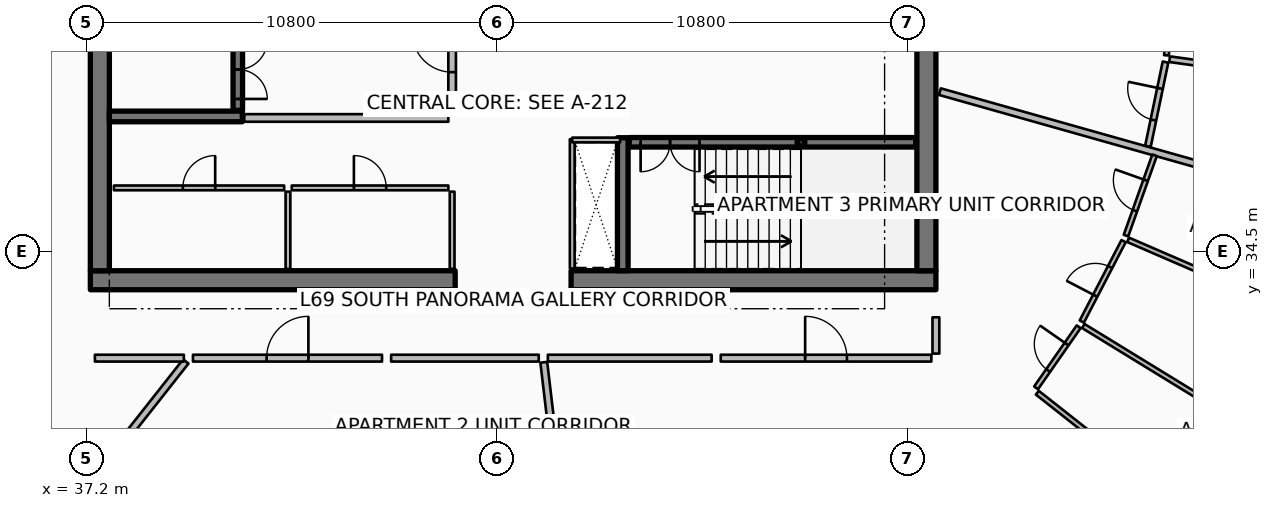
"""IFC4 building model, lengths in metres.
Left out: names, types, materials, properties, quantities, classifications, styles, units other than length and angle.
Written with IfcOpenShell. Run it as: python <this file> out.ifc"""

import sys

from ifc_helpers import new_model, si_unit, direction, frame, frame_2d, origin, origin_2d, place, context, subcontext, project, spatial, rectangle, hollow_rectangle, extrude, element, fill, save


model = new_model("IFC4")
c1 = context("Model", 3, precision=1e-05, world=origin(), true_north=direction((0.0, 1.0)))
c2 = subcontext(c1, "Body", "Model", "MODEL_VIEW")
j1 = project(units=[si_unit("LENGTHUNIT", "METRE"), si_unit("PLANEANGLEUNIT", "RADIAN")], contexts=[c1])
p1 = place(None, origin())
s1 = spatial("IfcSite", under=j1, at=p1, CompositionType="ELEMENT")
p2 = place(p1, origin())
s2 = spatial("IfcBuilding", under=s1, at=p2, CompositionType="ELEMENT")
p3 = place(p2, frame((0.0, 0.0, 275.2)))
s3 = spatial("IfcBuildingStorey", under=s2, at=p3, CompositionType="ELEMENT", Elevation=275.2)
p4 = place(p3, frame((37.3, 33.75, 0.0), z_axis=(0.0, 0.0, 1.0), x_axis=(1.0, 0.0, 0.0)))
e1 = element("IfcWall", 1, at=p4, inside=s3, PredefinedType="SHEAR", context=c2, shape_type="SweptSolid", body=[
    extrude(rectangle(XDim=9.6, YDim=0.5, at=frame_2d((4.8, 0.0))), origin(), (0.0, 0.0, 1.0), 3.85),
])
p5 = place(p3, frame((49.95, 33.75, 0.0), z_axis=(0.0, 0.0, 1.0), x_axis=(1.0, 0.0, 0.0)))
e2 = element("IfcWall", 2, at=p5, inside=s3, PredefinedType="SHEAR", context=c2, shape_type="SweptSolid", body=[
    extrude(rectangle(XDim=9.6, YDim=0.5, at=frame_2d((4.8, 0.0))), origin(), (0.0, 0.0, 1.0), 3.85),
])
for number, where, z_axis, x_axis in (
    (3, (37.55, 34.0, 0.0), (0.0, 0.0, 1.0), (0.0, 1.0, 0.0)),
    (4, (59.3, 34.0, 0.0), (0.0, 0.0, 1.0), (0.0, 1.0, 0.0)),
):
    element("IfcWall", number, at=place(p3, frame(where, z_axis=z_axis, x_axis=x_axis)), inside=s3, PredefinedType="SHEAR", context=c2, shape_type="SweptSolid", body=[
        extrude(rectangle(XDim=16.0, YDim=0.5, at=frame_2d((8.0, 0.0))), origin(), (0.0, 0.0, 1.0), 3.85),
    ])
for number, where, z_axis, x_axis in (
    (5, (37.8, 38.06, 0.0), (0.0, 0.0, 1.0), (1.0, 0.0, 0.0)),
    (6, (51.31, 34.0, 0.0), (0.0, 0.0, 1.0), (0.0, 1.0, 0.0)),
):
    element("IfcWall", number, at=place(p3, frame(where, z_axis=z_axis, x_axis=x_axis)), inside=s3, PredefinedType="SHEAR", context=c2, shape_type="SweptSolid", body=[
        extrude(rectangle(XDim=3.5, YDim=0.28, at=frame_2d((1.75, 0.0))), origin(), (0.0, 0.0, 1.0), 3.85),
    ])
p6 = place(p3, frame((56.0, 37.38, 0.0), z_axis=(0.0, 0.0, 1.0), x_axis=(1.0, 0.0, 0.0)))
e7 = element("IfcColumn", 7, at=p6, inside=s3, PredefinedType="COLUMN", context=c2, shape_type="SweptSolid", body=[
    extrude(hollow_rectangle(XDim=0.2, YDim=0.2, WallThickness=0.01, InnerFilletRadius=0.01, OuterFilletRadius=0.02, at=origin_2d()), origin(), (0.0, 0.0, 1.0), 1.72),
])
p7 = place(p3, frame((41.18, 38.22, 0.0), z_axis=(0.0, 0.0, 1.0), x_axis=(0.0, 1.0, 0.0)))
e8 = element("IfcWall", 8, at=p7, inside=s3, PredefinedType="SOLIDWALL", context=c2, shape_type="SweptSolid", body=[
    extrude(rectangle(XDim=7.56, YDim=0.25, at=frame_2d((3.78, 0.0))), origin(), (0.0, 0.0, 1.0), 3.59),
])
p8 = place(p7, frame((0.3, 0.0, 0.0)))
e9 = element("IfcOpeningElement", 9, at=p8, cuts=e8, PredefinedType="OPENING", context=c2, shape_type="SweptSolid", body=[
    extrude(rectangle(XDim=1.55, YDim=2.15, at=frame_2d((0.775, 1.075))), frame((0.0, 0.135, 0.0), z_axis=(0.0, -1.0, 0.0), x_axis=(1.0, 0.0, 0.0)), (0.0, 0.0, 1.0), 0.27),
])
p9 = place(p3, frame((51.48, 37.38, 0.0), z_axis=(0.0, 0.0, 1.0), x_axis=(1.0, 0.0, 0.0)))
e10 = element("IfcWall", 10, at=p9, inside=s3, PredefinedType="SOLIDWALL", context=c2, shape_type="SweptSolid", body=[
    extrude(rectangle(XDim=7.54, YDim=0.25, at=frame_2d((3.77, 0.0))), origin(), (0.0, 0.0, 1.0), 3.59),
])
p10 = place(p9, frame((0.3, 0.0, 0.0)))
e11 = element("IfcOpeningElement", 11, at=p10, cuts=e10, PredefinedType="OPENING", context=c2, shape_type="SweptSolid", body=[
    extrude(rectangle(XDim=1.55, YDim=2.15, at=frame_2d((0.775, 1.075))), frame((0.0, 0.135, 0.0), z_axis=(0.0, -1.0, 0.0), x_axis=(1.0, 0.0, 0.0)), (0.0, 0.0, 1.0), 0.27),
])
for number, where, z_axis, x_axis in (
    (12, (46.82, 34.05, 0.0), (0.0, 0.0, 1.0), (0.0, 1.0, 0.0)),
    (13, (42.5, 34.05, 0.0), (0.0, 0.0, 1.0), (0.0, 1.0, 0.0)),
):
    element("IfcWall", number, at=place(p3, frame(where, z_axis=z_axis, x_axis=x_axis)), inside=s3, PredefinedType="PARTITIONING", context=c2, shape_type="SweptSolid", body=[
        extrude(rectangle(XDim=2.03, YDim=0.125, at=frame_2d((1.015, 0.0))), origin(), (0.0, 0.0, 1.0), 3.03),
    ])
p11 = place(p3, frame((37.92, 36.18, 0.0), z_axis=(0.0, 0.0, 1.0), x_axis=(1.0, 0.0, 0.0)))
e14 = element("IfcWall", 14, at=p11, inside=s3, PredefinedType="PARTITIONING", context=c2, shape_type="SweptSolid", body=[
    extrude(rectangle(XDim=4.48, YDim=0.125, at=frame_2d((2.24, 0.0))), origin(), (0.0, 0.0, 1.0), 3.03),
])
p12 = place(p11, frame((1.815, 0.0, 0.0)))
e15 = element("IfcOpeningElement", 15, at=p12, cuts=e14, PredefinedType="OPENING", context=c2, shape_type="SweptSolid", body=[
    extrude(rectangle(XDim=0.85, YDim=2.06, at=frame_2d((0.425, 1.03))), frame((0.0, 0.073, 0.0), z_axis=(0.0, -1.0, 0.0), x_axis=(1.0, 0.0, 0.0)), (0.0, 0.0, 1.0), 0.145),
])
p13 = place(p3, frame((42.6, 36.18, 0.0), z_axis=(0.0, 0.0, 1.0), x_axis=(1.0, 0.0, 0.0)))
e16 = element("IfcWall", 16, at=p13, inside=s3, PredefinedType="PARTITIONING", context=c2, shape_type="SweptSolid", body=[
    extrude(rectangle(XDim=4.12, YDim=0.125, at=frame_2d((2.06, 0.0))), origin(), (0.0, 0.0, 1.0), 3.03),
])
p14 = place(p13, frame((1.635, 0.0, 0.0)))
e17 = element("IfcOpeningElement", 17, at=p14, cuts=e16, PredefinedType="OPENING", context=c2, shape_type="SweptSolid", body=[
    extrude(rectangle(XDim=0.85, YDim=2.06, at=frame_2d((0.425, 1.03))), frame((0.0, 0.073, 0.0), z_axis=(0.0, -1.0, 0.0), x_axis=(1.0, 0.0, 0.0)), (0.0, 0.0, 1.0), 0.145),
])
p15 = place(p3, frame((41.35, 38.02, 0.0), z_axis=(0.0, 0.0, 1.0), x_axis=(1.0, 0.0, 0.0)))
e18 = element("IfcWall", 18, at=p15, inside=s3, PredefinedType="PARTITIONING", context=c2, shape_type="SweptSolid", body=[
    extrude(rectangle(XDim=5.37, YDim=0.2, at=frame_2d((2.685, 0.0))), origin(), (0.0, 0.0, 1.0), 3.59),
])
p16 = place(p3, frame((46.82, 38.12, 0.0), z_axis=(0.0, 0.0, 1.0), x_axis=(0.0, 1.0, 0.0)))
e19 = element("IfcWall", 19, at=p16, inside=s3, PredefinedType="PARTITIONING", context=c2, shape_type="SweptSolid", body=[
    extrude(rectangle(XDim=3.26, YDim=0.2, at=frame_2d((1.63, 0.0))), origin(), (0.0, 0.0, 1.0), 3.59),
])
p17 = place(p16, frame((1.105, 0.0, 0.0)))
e20 = element("IfcOpeningElement", 20, at=p17, cuts=e19, PredefinedType="OPENING", context=c2, shape_type="SweptSolid", body=[
    extrude(rectangle(XDim=1.05, YDim=2.1, at=frame_2d((0.525, 1.05))), frame((0.0, 0.11, 0.0), z_axis=(0.0, -1.0, 0.0), x_axis=(1.0, 0.0, 0.0)), (0.0, 0.0, 1.0), 0.22),
])
p18 = place(p3, frame((49.98, 34.06, 0.0), z_axis=(0.0, 0.0, 1.0), x_axis=(0.0, 1.0, 0.0)))
e21 = element("IfcWall", 21, at=p18, inside=s3, PredefinedType="PARTITIONING", context=c2, shape_type="SweptSolid", body=[
    extrude(rectangle(XDim=3.4, YDim=0.125, at=frame_2d((1.7, 0.0))), origin(), (0.0, 0.0, 1.0), 3.03),
])
p19 = place(p3, frame((49.98, 37.44, 0.0), z_axis=(0.0, 0.0, 1.0), x_axis=(1.0, 0.0, 0.0)))
e22 = element("IfcWall", 22, at=p19, inside=s3, PredefinedType="PARTITIONING", context=c2, shape_type="SweptSolid", body=[
    extrude(rectangle(XDim=1.26, YDim=0.125, at=frame_2d((0.63, 0.0))), origin(), (0.0, 0.0, 1.0), 3.03),
])
p20 = place(p3, frame((39.812, 31.614, 0.0), z_axis=(0.0, 0.0, 1.0), x_axis=(-0.619097230176, -0.785314344443, 0.0)))
e23 = element("IfcWall", 23, at=p20, inside=s3, PredefinedType="PARTITIONING", context=c2, shape_type="SweptSolid", body=[
    extrude(rectangle(XDim=16.37, YDim=0.18, at=frame_2d((8.185, 0.0))), origin(), (0.0, 0.0, 1.0), 2.957),
])
p21 = place(p3, frame((49.232, 31.591, 0.0), z_axis=(0.0, 0.0, 1.0), x_axis=(0.117545848714, -0.993067456646, 0.0)))
e24 = element("IfcWall", 24, at=p21, inside=s3, PredefinedType="PARTITIONING", context=c2, shape_type="SweptSolid", body=[
    extrude(rectangle(XDim=14.213, YDim=0.18, at=frame_2d((7.106, 0.0))), origin(), (0.0, 0.0, 1.0), 2.957),
])
p22 = place(p3, frame((59.656, 38.713, 0.0), z_axis=(0.0, 0.0, 1.0), x_axis=(0.962454756022, -0.27144215334, 0.0)))
e25 = element("IfcWall", 25, at=p22, inside=s3, PredefinedType="PARTITIONING", context=c2, shape_type="SweptSolid", body=[
    extrude(rectangle(XDim=17.385, YDim=0.18, at=frame_2d((8.692, 0.0))), origin(), (0.0, 0.0, 1.0), 2.957),
])
p23 = place(p3, frame((37.42, 31.7, 0.0), z_axis=(0.0, 0.0, 1.0), x_axis=(1.0, 0.0, 0.0)))
e26 = element("IfcWall", 26, at=p23, inside=s3, PredefinedType="PARTITIONING", context=c2, shape_type="SweptSolid", body=[
    extrude(rectangle(XDim=2.34, YDim=0.18, at=frame_2d((1.17, 0.0))), origin(), (0.0, 0.0, 1.0), 2.957),
])
p24 = place(p3, frame((40.0, 31.7, 0.0), z_axis=(0.0, 0.0, 1.0), x_axis=(1.0, 0.0, 0.0)))
e27 = element("IfcWall", 27, at=p24, inside=s3, PredefinedType="PARTITIONING", context=c2, shape_type="SweptSolid", body=[
    extrude(rectangle(XDim=4.975, YDim=0.18, at=frame_2d((2.488, 0.0))), origin(), (0.0, 0.0, 1.0), 2.957),
])
p25 = place(p24, frame((1.938, 0.0, 0.0)))
e28 = element("IfcOpeningElement", 28, at=p25, cuts=e27, PredefinedType="OPENING", context=c2, shape_type="SweptSolid", body=[
    extrude(rectangle(XDim=1.1, YDim=2.1, at=frame_2d((0.55, 1.05))), frame((0.0, 0.1, 0.0), z_axis=(0.0, -1.0, 0.0), x_axis=(1.0, 0.0, 0.0)), (0.0, 0.0, 1.0), 0.2),
])
p26 = place(p3, frame((45.215, 31.7, 0.0), z_axis=(0.0, 0.0, 1.0), x_axis=(1.0, 0.0, 0.0)))
e29 = element("IfcWall", 29, at=p26, inside=s3, PredefinedType="PARTITIONING", context=c2, shape_type="SweptSolid", body=[
    extrude(rectangle(XDim=3.884, YDim=0.18, at=frame_2d((1.942, 0.0))), origin(), (0.0, 0.0, 1.0), 2.957),
])
p27 = place(p3, frame((53.888, 31.7, 0.0), z_axis=(0.0, 0.0, 1.0), x_axis=(1.0, 0.0, 0.0)))
e30 = element("IfcWall", 30, at=p27, inside=s3, PredefinedType="PARTITIONING", context=c2, shape_type="SweptSolid", body=[
    extrude(rectangle(XDim=5.542, YDim=0.18, at=frame_2d((2.771, 0.0))), origin(), (0.0, 0.0, 1.0), 2.957),
])
p28 = place(p27, frame((2.221, 0.0, 0.0)))
e31 = element("IfcOpeningElement", 31, at=p28, cuts=e30, PredefinedType="OPENING", context=c2, shape_type="SweptSolid", body=[
    extrude(rectangle(XDim=1.1, YDim=2.1, at=frame_2d((0.55, 1.05))), frame((0.0, 0.1, 0.0), z_axis=(0.0, -1.0, 0.0), x_axis=(1.0, 0.0, 0.0)), (0.0, 0.0, 1.0), 0.2),
])
p29 = place(p3, frame((59.55, 31.82, 0.0), z_axis=(0.0, 0.0, 1.0), x_axis=(0.0, 1.0, 0.0)))
e32 = element("IfcWall", 32, at=p29, inside=s3, PredefinedType="PARTITIONING", context=c2, shape_type="SweptSolid", body=[
    extrude(rectangle(XDim=0.955, YDim=0.18, at=frame_2d((0.477, 0.0))), origin(), (0.0, 0.0, 1.0), 2.957),
])
p30 = place(p3, frame((49.339, 31.7, 0.0), z_axis=(0.0, 0.0, 1.0), x_axis=(1.0, 0.0, 0.0)))
e33 = element("IfcWall", 33, at=p30, inside=s3, PredefinedType="PARTITIONING", context=c2, shape_type="SweptSolid", body=[
    extrude(rectangle(XDim=4.309, YDim=0.18, at=frame_2d((2.155, 0.0))), origin(), (0.0, 0.0, 1.0), 2.957),
])
p31 = place(p3, frame((62.219, 30.791, 0.0), z_axis=(0.0, 0.0, 1.0), x_axis=(0.785316198055, -0.619094878893, 0.0)))
e34 = element("IfcWall", 34, at=p31, inside=s3, PredefinedType="PARTITIONING", context=c2, shape_type="SweptSolid", body=[
    extrude(rectangle(XDim=8.979, YDim=0.125, at=frame_2d((4.489, 0.0))), origin(), (0.0, 0.0, 1.0), 2.957),
])
p32 = place(p3, frame((63.429, 32.545, 0.0), z_axis=(0.0, 0.0, 1.0), x_axis=(0.852634226121, -0.522508254907, 0.0)))
e35 = element("IfcWall", 35, at=p32, inside=s3, PredefinedType="PARTITIONING", context=c2, shape_type="SweptSolid", body=[
    extrude(rectangle(XDim=9.151, YDim=0.125, at=frame_2d((4.576, 0.0))), origin(), (0.0, 0.0, 1.0), 3.03),
])
p33 = place(p3, frame((64.608, 34.813, 0.0), z_axis=(0.0, 0.0, 1.0), x_axis=(0.917754543675, -0.397148080146, 0.0)))
e36 = element("IfcWall", 36, at=p33, inside=s3, PredefinedType="PARTITIONING", context=c2, shape_type="SweptSolid", body=[
    extrude(rectangle(XDim=9.994, YDim=0.125, at=frame_2d((4.997, 0.0))), origin(), (0.0, 0.0, 1.0), 3.03),
])
p34 = place(p3, frame((62.186, 30.918, 0.0), z_axis=(0.0, 0.0, 1.0), x_axis=(0.571797742108, 0.820394625848, 0.0)))
e37 = element("IfcWall", 37, at=p34, inside=s3, PredefinedType="PARTITIONING", context=c2, shape_type="SweptSolid", body=[
    extrude(rectangle(XDim=1.96, YDim=0.125, at=frame_2d((0.98, 0.0))), origin(), (0.0, 0.0, 1.0), 2.957),
])
p35 = place(p34, frame((0.555, 0.0, 0.0)))
e38 = element("IfcOpeningElement", 38, at=p35, cuts=e37, PredefinedType="OPENING", context=c2, shape_type="SweptSolid", body=[
    extrude(rectangle(XDim=0.85, YDim=2.06, at=frame_2d((0.425, 1.03))), frame((0.0, 0.073, 0.0), z_axis=(0.0, -1.0, 0.0), x_axis=(1.0, 0.0, 0.0)), (0.0, 0.0, 1.0), 0.145),
])
p36 = place(p3, frame((63.389, 32.663, 0.0), z_axis=(0.0, 0.0, 1.0), x_axis=(0.461007635573, 0.887396168542, 0.0)))
e39 = element("IfcWall", 39, at=p36, inside=s3, PredefinedType="PARTITIONING", context=c2, shape_type="SweptSolid", body=[
    extrude(rectangle(XDim=2.384, YDim=0.125, at=frame_2d((1.192, 0.0))), origin(), (0.0, 0.0, 1.0), 3.03),
])
p37 = place(p36, frame((0.767, 0.0, 0.0)))
e40 = element("IfcOpeningElement", 40, at=p37, cuts=e39, PredefinedType="OPENING", context=c2, shape_type="SweptSolid", body=[
    extrude(rectangle(XDim=0.85, YDim=2.06, at=frame_2d((0.425, 1.03))), frame((0.0, 0.073, 0.0), z_axis=(0.0, -1.0, 0.0), x_axis=(1.0, 0.0, 0.0)), (0.0, 0.0, 1.0), 0.145),
])
p38 = place(p3, frame((64.552, 34.924, 0.0), z_axis=(0.0, 0.0, 1.0), x_axis=(0.335011815583, 0.942213926569, 0.0)))
e41 = element("IfcWall", 41, at=p38, inside=s3, PredefinedType="PARTITIONING", context=c2, shape_type="SweptSolid", body=[
    extrude(rectangle(XDim=2.242, YDim=0.125, at=frame_2d((1.121, 0.0))), origin(), (0.0, 0.0, 1.0), 2.957),
])
p39 = place(p38, frame((0.696, 0.0, 0.0)))
e42 = element("IfcOpeningElement", 42, at=p39, cuts=e41, PredefinedType="OPENING", context=c2, shape_type="SweptSolid", body=[
    extrude(rectangle(XDim=0.85, YDim=2.06, at=frame_2d((0.425, 1.03))), frame((0.0, 0.073, 0.0), z_axis=(0.0, -1.0, 0.0), x_axis=(1.0, 0.0, 0.0)), (0.0, 0.0, 1.0), 0.145),
])
p40 = place(p3, frame((65.129, 37.273, 0.0), z_axis=(0.0, 0.0, 1.0), x_axis=(0.204337271361, 0.978900546293, 0.0)))
e43 = element("IfcWall", 43, at=p40, inside=s3, PredefinedType="PARTITIONING", context=c2, shape_type="SweptSolid", body=[
    extrude(rectangle(XDim=2.265, YDim=0.15, at=frame_2d((1.133, 0.0))), origin(), (0.0, 0.0, 1.0), 2.957),
])
p41 = place(p40, frame((0.708, 0.0, 0.0)))
e44 = element("IfcOpeningElement", 44, at=p41, cuts=e43, PredefinedType="OPENING", context=c2, shape_type="SweptSolid", body=[
    extrude(rectangle(XDim=0.85, YDim=2.06, at=frame_2d((0.425, 1.03))), frame((0.0, 0.085, 0.0), z_axis=(0.0, -1.0, 0.0), x_axis=(1.0, 0.0, 0.0)), (0.0, 0.0, 1.0), 0.17),
])
p42 = place(p3, frame((65.699, 39.566, 0.0), z_axis=(0.0, 0.0, 1.0), x_axis=(0.990678437061, -0.136221269786, 0.0)))
e45 = element("IfcWall", 45, at=p42, inside=s3, PredefinedType="PARTITIONING", context=c2, shape_type="SweptSolid", body=[
    extrude(rectangle(XDim=4.09, YDim=0.15, at=frame_2d((2.045, 0.0))), origin(), (0.0, 0.0, 1.0), 3.03),
])
p43 = place(p3, frame((65.617, 39.668, 0.0), z_axis=(0.0, 0.0, 1.0), x_axis=(0.072890621107, 0.99733994072, 0.0)))
e46 = element("IfcWall", 46, at=p43, inside=s3, PredefinedType="PARTITIONING", context=c2, shape_type="SweptSolid", body=[
    extrude(rectangle(XDim=2.09, YDim=0.125, at=frame_2d((1.045, 0.0))), origin(), (0.0, 0.0, 1.0), 3.03),
])
p44 = place(p43, frame((0.62, 0.0, 0.0)))
e47 = element("IfcOpeningElement", 47, at=p44, cuts=e46, PredefinedType="OPENING", context=c2, shape_type="SweptSolid", body=[
    extrude(rectangle(XDim=0.85, YDim=2.06, at=frame_2d((0.425, 1.03))), frame((0.0, 0.073, 0.0), z_axis=(0.0, -1.0, 0.0), x_axis=(1.0, 0.0, 0.0)), (0.0, 0.0, 1.0), 0.145),
])
p45 = place(p8, origin())
e48 = element("IfcDoor", 48, at=p45, inside=s3, OperationType="DOUBLE_DOOR_SINGLE_SWING", PredefinedType="DOOR", context=c2, shape_type="SweptSolid", body=[
    extrude(rectangle(XDim=1.55, YDim=2.15, at=frame_2d((0.775, 1.075))), frame((0.0, 0.025, 0.0), z_axis=(0.0, -1.0, 0.0), x_axis=(1.0, 0.0, 0.0)), (0.0, 0.0, 1.0), 0.05),
])
fill(e9, e48)
p46 = place(p10, origin())
e49 = element("IfcDoor", 49, at=p46, inside=s3, OperationType="DOUBLE_DOOR_SINGLE_SWING", PredefinedType="DOOR", context=c2, shape_type="SweptSolid", body=[
    extrude(rectangle(XDim=1.55, YDim=2.15, at=frame_2d((0.775, 1.075))), frame((0.0, 0.025, 0.0), z_axis=(0.0, -1.0, 0.0), x_axis=(1.0, 0.0, 0.0)), (0.0, 0.0, 1.0), 0.05),
])
fill(e11, e49)
p47 = place(p12, origin())
e50 = element("IfcDoor", 50, at=p47, inside=s3, OperationType="SINGLE_SWING_RIGHT", PredefinedType="DOOR", context=c2, shape_type="SweptSolid", body=[
    extrude(rectangle(XDim=0.85, YDim=2.06, at=frame_2d((0.425, 1.03))), frame((0.0, 0.025, 0.0), z_axis=(0.0, -1.0, 0.0), x_axis=(1.0, 0.0, 0.0)), (0.0, 0.0, 1.0), 0.05),
])
fill(e15, e50)
p48 = place(p14, origin())
e51 = element("IfcDoor", 51, at=p48, inside=s3, OperationType="SINGLE_SWING_LEFT", PredefinedType="DOOR", context=c2, shape_type="SweptSolid", body=[
    extrude(rectangle(XDim=0.85, YDim=2.06, at=frame_2d((0.425, 1.03))), frame((0.0, 0.025, 0.0), z_axis=(0.0, -1.0, 0.0), x_axis=(1.0, 0.0, 0.0)), (0.0, 0.0, 1.0), 0.05),
])
fill(e17, e51)
p49 = place(p17, origin())
e52 = element("IfcDoor", 52, at=p49, inside=s3, OperationType="SINGLE_SWING_RIGHT", PredefinedType="DOOR", context=c2, shape_type="SweptSolid", body=[
    extrude(rectangle(XDim=1.05, YDim=2.1, at=frame_2d((0.525, 1.05))), frame((0.0, 0.025, 0.0), z_axis=(0.0, -1.0, 0.0), x_axis=(1.0, 0.0, 0.0)), (0.0, 0.0, 1.0), 0.05),
])
fill(e20, e52)
p50 = place(p25, origin())
e53 = element("IfcDoor", 53, at=p50, inside=s3, OperationType="SINGLE_SWING_RIGHT", PredefinedType="DOOR", context=c2, shape_type="SweptSolid", body=[
    extrude(rectangle(XDim=1.1, YDim=2.1, at=frame_2d((0.55, 1.05))), frame((0.0, 0.025, 0.0), z_axis=(0.0, -1.0, 0.0), x_axis=(1.0, 0.0, 0.0)), (0.0, 0.0, 1.0), 0.05),
])
fill(e28, e53)
p51 = place(p28, origin())
e54 = element("IfcDoor", 54, at=p51, inside=s3, OperationType="SINGLE_SWING_LEFT", PredefinedType="DOOR", context=c2, shape_type="SweptSolid", body=[
    extrude(rectangle(XDim=1.1, YDim=2.1, at=frame_2d((0.55, 1.05))), frame((0.0, 0.025, 0.0), z_axis=(0.0, -1.0, 0.0), x_axis=(1.0, 0.0, 0.0)), (0.0, 0.0, 1.0), 0.05),
])
fill(e31, e54)
p52 = place(p35, origin())
e55 = element("IfcDoor", 55, at=p52, inside=s3, OperationType="SINGLE_SWING_RIGHT", PredefinedType="DOOR", context=c2, shape_type="SweptSolid", body=[
    extrude(rectangle(XDim=0.85, YDim=2.06, at=frame_2d((0.425, 1.03))), frame((0.0, 0.025, 0.0), z_axis=(0.0, -1.0, 0.0), x_axis=(1.0, 0.0, 0.0)), (0.0, 0.0, 1.0), 0.05),
])
fill(e38, e55)
p53 = place(p37, origin())
e56 = element("IfcDoor", 56, at=p53, inside=s3, OperationType="SINGLE_SWING_LEFT", PredefinedType="DOOR", context=c2, shape_type="SweptSolid", body=[
    extrude(rectangle(XDim=0.85, YDim=2.06, at=frame_2d((0.425, 1.03))), frame((0.0, 0.025, 0.0), z_axis=(0.0, -1.0, 0.0), x_axis=(1.0, 0.0, 0.0)), (0.0, 0.0, 1.0), 0.05),
])
fill(e40, e56)
p54 = place(p39, origin())
e57 = element("IfcDoor", 57, at=p54, inside=s3, OperationType="SINGLE_SWING_RIGHT", PredefinedType="DOOR", context=c2, shape_type="SweptSolid", body=[
    extrude(rectangle(XDim=0.85, YDim=2.06, at=frame_2d((0.425, 1.03))), frame((0.0, 0.025, 0.0), z_axis=(0.0, -1.0, 0.0), x_axis=(1.0, 0.0, 0.0)), (0.0, 0.0, 1.0), 0.05),
])
fill(e42, e57)
p55 = place(p41, origin())
e58 = element("IfcDoor", 58, at=p55, inside=s3, OperationType="SINGLE_SWING_RIGHT", PredefinedType="DOOR", context=c2, shape_type="SweptSolid", body=[
    extrude(rectangle(XDim=0.85, YDim=2.06, at=frame_2d((0.425, 1.03))), frame((0.0, 0.025, 0.0), z_axis=(0.0, -1.0, 0.0), x_axis=(1.0, 0.0, 0.0)), (0.0, 0.0, 1.0), 0.05),
])
fill(e44, e58)
save(model, sys.argv[1])
